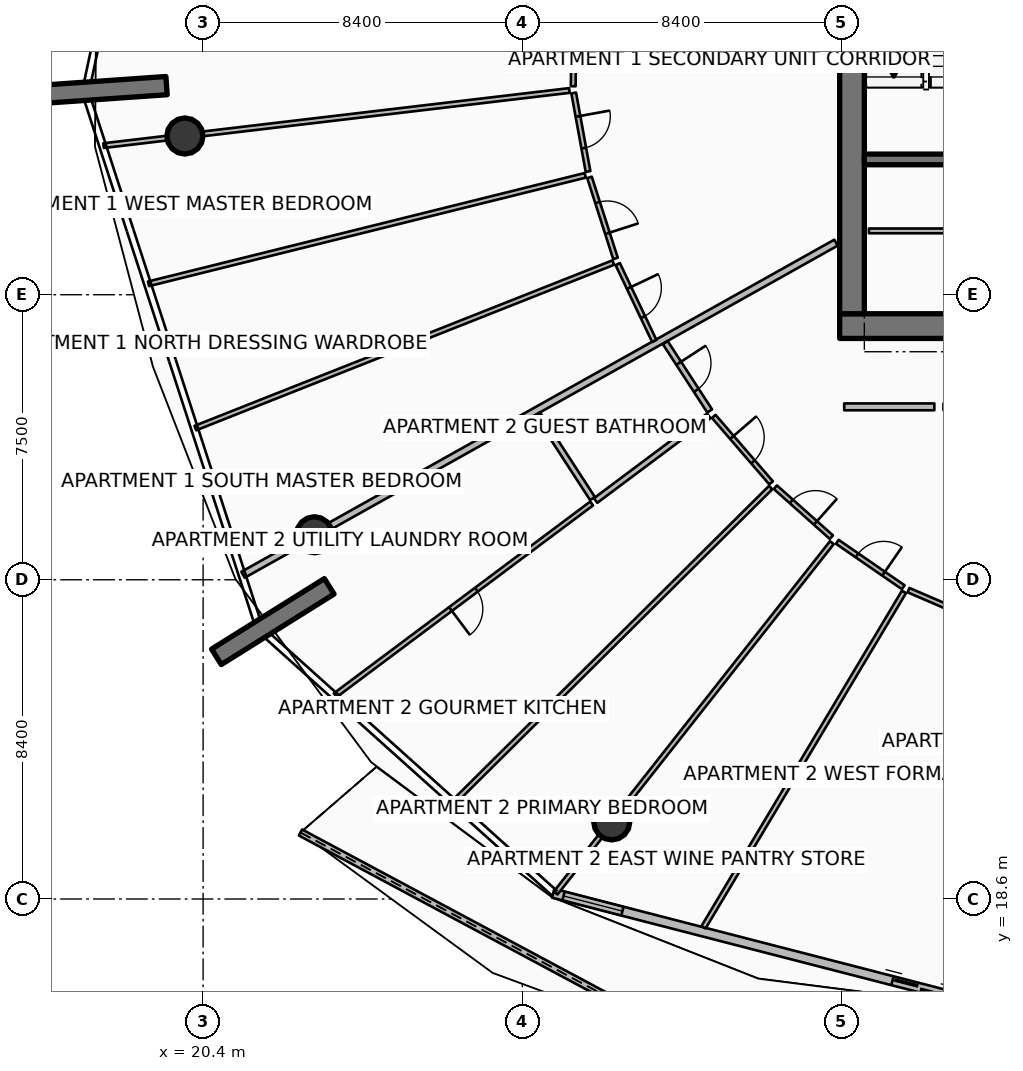
"""IFC4 building model, lengths in metres.
Left out: names, types, materials, properties, quantities, classifications, styles, units other than length and angle.
Written with IfcOpenShell. Run it as: python <this file> out.ifc"""

import sys

from ifc_helpers import new_model, si_unit, direction, frame, frame_2d, origin, origin_2d, place, context, subcontext, project, spatial, polyline, rectangle, circle, outline, extrude, element, fill, save


model = new_model("IFC4")
c1 = context("Model", 3, precision=1e-05, world=origin(), true_north=direction((0.0, 1.0)))
c2 = subcontext(c1, "Body", "Model", "MODEL_VIEW")
j1 = project(units=[si_unit("LENGTHUNIT", "METRE"), si_unit("PLANEANGLEUNIT", "RADIAN")], contexts=[c1])
p1 = place(None, origin())
s1 = spatial("IfcSite", under=j1, at=p1, CompositionType="ELEMENT")
p2 = place(p1, origin())
s2 = spatial("IfcBuilding", under=s1, at=p2, CompositionType="ELEMENT")
p3 = place(p2, frame((0.0, 0.0, 248.25)))
s3 = spatial("IfcBuildingStorey", under=s2, at=p3, CompositionType="ELEMENT", Elevation=248.25)
p4 = place(p3, frame((37.15, 33.675, 0.0), z_axis=(0.0, 0.0, 1.0), x_axis=(1.0, 0.0, 0.0)))
e1 = element("IfcWall", 1, at=p4, inside=s3, PredefinedType="SHEAR", context=c2, shape_type="SweptSolid", body=[
    extrude(rectangle(XDim=9.75, YDim=0.65, at=frame_2d((4.875, 0.0))), origin(), (0.0, 0.0, 1.0), 3.85),
])
p5 = place(p3, frame((37.475, 34.0, 0.0), z_axis=(0.0, 0.0, 1.0), x_axis=(0.0, 1.0, 0.0)))
e2 = element("IfcWall", 2, at=p5, inside=s3, PredefinedType="SHEAR", context=c2, shape_type="SweptSolid", body=[
    extrude(rectangle(XDim=16.0, YDim=0.65, at=frame_2d((8.0, 0.0))), origin(), (0.0, 0.0, 1.0), 3.85),
])
p6 = place(p3, frame((37.8, 38.06, 0.0), z_axis=(0.0, 0.0, 1.0), x_axis=(1.0, 0.0, 0.0)))
e3 = element("IfcWall", 3, at=p6, inside=s3, PredefinedType="SHEAR", context=c2, shape_type="SweptSolid", body=[
    extrude(rectangle(XDim=3.5, YDim=0.28, at=frame_2d((1.75, 0.0))), origin(), (0.0, 0.0, 1.0), 3.85),
])
p7 = place(p3, frame((19.438, 40.003, 0.0), z_axis=(0.0, 0.0, 1.0), x_axis=(-0.997563824095, -0.069759707979, 0.0)))
e4 = element("IfcWall", 4, at=p7, inside=s3, PredefinedType="SOLIDWALL", context=c2, shape_type="SweptSolid", body=[
    extrude(rectangle(XDim=3.5, YDim=0.48, at=frame_2d((1.75, 0.0))), origin(), (0.0, 0.0, 1.0), 3.85),
])
p8 = place(p3, frame((23.719, 26.827, 0.0), z_axis=(0.0, 0.0, 1.0), x_axis=(-0.848033572426, -0.529942506352, 0.0)))
e5 = element("IfcWall", 5, at=p8, inside=s3, PredefinedType="SOLIDWALL", context=c2, shape_type="SweptSolid", body=[
    extrude(rectangle(XDim=3.5, YDim=0.48, at=frame_2d((1.75, 0.0))), origin(), (0.0, 0.0, 1.0), 3.85),
])
for number, where, z_axis, x_axis in (
    (6, (19.92, 38.677, 0.0), (0.0, 0.0, 1.0), (1.0, 0.0, 0.0)),
    (7, (23.33, 28.184, 0.0), (0.0, 0.0, 1.0), (1.0, 0.0, 0.0)),
    (8, (31.153, 20.629, 0.0), (0.0, 0.0, 1.0), (1.0, 0.0, 0.0)),
):
    element("IfcColumn", number, at=place(p3, frame(where, z_axis=z_axis, x_axis=x_axis)), inside=s3, PredefinedType="COLUMN", context=c2, shape_type="SweptSolid", body=[
        extrude(circle(Radius=0.475, at=origin_2d()), origin(), (0.0, 0.0, 1.0), 3.59),
    ])
p9 = place(p3, frame((22.962, 20.35, 0.0), z_axis=(0.0, 0.0, 1.0), x_axis=(0.881580944095, -0.472032879161, 0.0)))
e9 = element("IfcWall", 9, at=p9, inside=s3, PredefinedType="PARAPET", context=c2, shape_type="SweptSolid", body=[
    extrude(outline(polyline([(0.0, 0.0), (12.362, 0.0), (12.362, 1.632), (6.181, 1.798), (0.0, 1.86), (0.0, 0.0)])), frame((0.0, 0.09, 0.0), z_axis=(0.0, -1.0, 0.0), x_axis=(1.0, 0.0, 0.0)), (0.0, 0.0, 1.0), 0.18),
])
p10 = place(p3, frame((29.614, 18.751, 0.0), z_axis=(0.0, 0.0, 1.0), x_axis=(0.968343758421, -0.249620442927, 0.0)))
e10 = element("IfcWall", 10, at=p10, inside=s3, PredefinedType="SOLIDWALL", context=c2, shape_type="SweptSolid", body=[
    extrude(rectangle(XDim=11.438, YDim=0.24, at=frame_2d((5.719, 0.0))), origin(), (0.0, 0.0, 1.0), 2.54),
])
p11 = place(p10, frame((9.218, 0.0, 0.0)))
e11 = element("IfcOpeningElement", 11, at=p11, cuts=e10, PredefinedType="OPENING", context=c2, shape_type="SweptSolid", body=[
    extrude(rectangle(XDim=1.45, YDim=2.15, at=frame_2d((0.725, 1.075))), frame((0.0, 0.13, 0.0), z_axis=(0.0, -1.0, 0.0), x_axis=(1.0, 0.0, 0.0)), (0.0, 0.0, 1.0), 0.26),
])
p12 = place(p10, frame((0.28, 0.0, 0.65)))
e12 = element("IfcOpeningElement", 12, at=p12, cuts=e10, PredefinedType="OPENING", context=c2, shape_type="SweptSolid", body=[
    extrude(rectangle(XDim=1.6, YDim=1.5, at=frame_2d((0.8, 0.75))), frame((0.0, 0.13, 0.0), z_axis=(0.0, -1.0, 0.0), x_axis=(1.0, 0.0, 0.0)), (0.0, 0.0, 1.0), 0.26),
])
p13 = place(p3, frame((37.92, 36.18, 0.0), z_axis=(0.0, 0.0, 1.0), x_axis=(1.0, 0.0, 0.0)))
e13 = element("IfcWall", 13, at=p13, inside=s3, PredefinedType="PARTITIONING", context=c2, shape_type="SweptSolid", body=[
    extrude(rectangle(XDim=8.8, YDim=0.125, at=frame_2d((4.4, 0.0))), origin(), (0.0, 0.0, 1.0), 3.03),
])
p14 = place(p13, frame((3.975, 0.0, 0.0)))
e14 = element("IfcOpeningElement", 14, at=p14, cuts=e13, PredefinedType="OPENING", context=c2, shape_type="SweptSolid", body=[
    extrude(rectangle(XDim=0.85, YDim=2.06, at=frame_2d((0.425, 1.03))), frame((0.0, 0.073, 0.0), z_axis=(0.0, -1.0, 0.0), x_axis=(1.0, 0.0, 0.0)), (0.0, 0.0, 1.0), 0.145),
])
p15 = place(p3, frame((37.054, 35.87, 0.0), z_axis=(0.0, 0.0, 1.0), x_axis=(-0.872490186067, -0.488631635506, 0.0)))
e15 = element("IfcWall", 15, at=p15, inside=s3, PredefinedType="PARTITIONING", context=c2, shape_type="SweptSolid", body=[
    extrude(rectangle(XDim=17.884, YDim=0.18, at=frame_2d((8.942, 0.0))), origin(), (0.0, 0.0, 1.0), 2.957),
])
p16 = place(p3, frame((30.204, 44.538, 0.0), z_axis=(0.0, 0.0, 1.0), x_axis=(-0.014156354672, -0.999899793791, 0.0)))
e16 = element("IfcWall", 16, at=p16, inside=s3, PredefinedType="PARTITIONING", context=c2, shape_type="SweptSolid", body=[
    extrude(rectangle(XDim=4.553, YDim=0.125, at=frame_2d((2.276, 0.0))), origin(), (0.0, 0.0, 1.0), 2.957),
])
p17 = place(p16, frame((1.826, 0.0, 0.0)))
e17 = element("IfcOpeningElement", 17, at=p17, cuts=e16, PredefinedType="OPENING", context=c2, shape_type="SweptSolid", body=[
    extrude(rectangle(XDim=0.9, YDim=2.08, at=frame_2d((0.45, 1.04))), frame((0.0, 0.073, 0.0), z_axis=(0.0, -1.0, 0.0), x_axis=(1.0, 0.0, 0.0)), (0.0, 0.0, 1.0), 0.145),
])
p18 = place(p3, frame((30.038, 39.874, 0.0), z_axis=(0.0, 0.0, 1.0), x_axis=(-0.993068810962, -0.117534406428, 0.0)))
e18 = element("IfcWall", 18, at=p18, inside=s3, PredefinedType="PARTITIONING", context=c2, shape_type="SweptSolid", body=[
    extrude(rectangle(XDim=12.343, YDim=0.125, at=frame_2d((6.171, 0.0))), origin(), (0.0, 0.0, 1.0), 2.957),
])
p19 = place(p3, frame((30.456, 37.642, 0.0), z_axis=(0.0, 0.0, 1.0), x_axis=(-0.970505215381, -0.241080125513, 0.0)))
e19 = element("IfcWall", 19, at=p19, inside=s3, PredefinedType="PARTITIONING", context=c2, shape_type="SweptSolid", body=[
    extrude(rectangle(XDim=11.843, YDim=0.125, at=frame_2d((5.921, 0.0))), origin(), (0.0, 0.0, 1.0), 3.03),
])
p20 = place(p3, frame((31.192, 35.345, 0.0), z_axis=(0.0, 0.0, 1.0), x_axis=(-0.929773642051, -0.368131735317, 0.0)))
e20 = element("IfcWall", 20, at=p20, inside=s3, PredefinedType="PARTITIONING", context=c2, shape_type="SweptSolid", body=[
    extrude(rectangle(XDim=11.827, YDim=0.125, at=frame_2d((5.913, 0.0))), origin(), (0.0, 0.0, 1.0), 3.03),
])
p21 = place(p3, frame((30.152, 39.807, 0.0), z_axis=(0.0, 0.0, 1.0), x_axis=(0.179601937348, -0.983739367973, 0.0)))
e21 = element("IfcWall", 21, at=p21, inside=s3, PredefinedType="PARTITIONING", context=c2, shape_type="SweptSolid", body=[
    extrude(rectangle(XDim=2.099, YDim=0.125, at=frame_2d((1.049, 0.0))), origin(), (0.0, 0.0, 1.0), 2.957),
])
p22 = place(p21, frame((0.625, 0.0, 0.0)))
e22 = element("IfcOpeningElement", 22, at=p22, cuts=e21, PredefinedType="OPENING", context=c2, shape_type="SweptSolid", body=[
    extrude(rectangle(XDim=0.85, YDim=2.06, at=frame_2d((0.425, 1.03))), frame((0.0, 0.073, 0.0), z_axis=(0.0, -1.0, 0.0), x_axis=(1.0, 0.0, 0.0)), (0.0, 0.0, 1.0), 0.145),
])
p23 = place(p3, frame((30.568, 37.588, 0.0), z_axis=(0.0, 0.0, 1.0), x_axis=(0.305285840617, -0.952260760254, 0.0)))
e23 = element("IfcWall", 23, at=p23, inside=s3, PredefinedType="PARTITIONING", context=c2, shape_type="SweptSolid", body=[
    extrude(rectangle(XDim=2.24, YDim=0.125, at=frame_2d((1.12, 0.0))), origin(), (0.0, 0.0, 1.0), 3.03),
])
p24 = place(p23, frame((0.695, 0.0, 0.0)))
e24 = element("IfcOpeningElement", 24, at=p24, cuts=e23, PredefinedType="OPENING", context=c2, shape_type="SweptSolid", body=[
    extrude(rectangle(XDim=0.85, YDim=2.06, at=frame_2d((0.425, 1.03))), frame((0.0, 0.073, 0.0), z_axis=(0.0, -1.0, 0.0), x_axis=(1.0, 0.0, 0.0)), (0.0, 0.0, 1.0), 0.145),
])
p25 = place(p3, frame((31.31, 35.306, 0.0), z_axis=(0.0, 0.0, 1.0), x_axis=(0.429468098594, -0.903082029657, 0.0)))
e25 = element("IfcWall", 25, at=p25, inside=s3, PredefinedType="PARTITIONING", context=c2, shape_type="SweptSolid", body=[
    extrude(rectangle(XDim=2.24, YDim=0.125, at=frame_2d((1.12, 0.0))), origin(), (0.0, 0.0, 1.0), 2.957),
])
p26 = place(p25, frame((0.695, 0.0, 0.0)))
e26 = element("IfcOpeningElement", 26, at=p26, cuts=e25, PredefinedType="OPENING", context=c2, shape_type="SweptSolid", body=[
    extrude(rectangle(XDim=0.85, YDim=2.06, at=frame_2d((0.425, 1.03))), frame((0.0, 0.073, 0.0), z_axis=(0.0, -1.0, 0.0), x_axis=(1.0, 0.0, 0.0)), (0.0, 0.0, 1.0), 0.145),
])
p27 = place(p3, frame((37.27, 31.55, 0.0), z_axis=(0.0, 0.0, 1.0), x_axis=(1.0, 0.0, 0.0)))
e27 = element("IfcWall", 27, at=p27, inside=s3, PredefinedType="PARTITIONING", context=c2, shape_type="SweptSolid", body=[
    extrude(rectangle(XDim=2.372, YDim=0.18, at=frame_2d((1.186, 0.0))), origin(), (0.0, 0.0, 1.0), 2.957),
])
p28 = place(p3, frame((32.562, 33.24, 0.0), z_axis=(0.0, 0.0, 1.0), x_axis=(0.544888302375, -0.838508639154, 0.0)))
e28 = element("IfcWall", 28, at=p28, inside=s3, PredefinedType="PARTITIONING", context=c2, shape_type="SweptSolid", body=[
    extrude(rectangle(XDim=2.144, YDim=0.15, at=frame_2d((1.072, 0.0))), origin(), (0.0, 0.0, 1.0), 2.957),
])
p29 = place(p28, frame((0.647, 0.0, 0.0)))
e29 = element("IfcOpeningElement", 29, at=p29, cuts=e28, PredefinedType="OPENING", context=c2, shape_type="SweptSolid", body=[
    extrude(rectangle(XDim=0.85, YDim=2.06, at=frame_2d((0.425, 1.03))), frame((0.0, 0.085, 0.0), z_axis=(0.0, -1.0, 0.0), x_axis=(1.0, 0.0, 0.0)), (0.0, 0.0, 1.0), 0.17),
])
p30 = place(p3, frame((29.202, 31.359, 0.0), z_axis=(0.0, 0.0, 1.0), x_axis=(0.544926834082, -0.838483598825, 0.0)))
e30 = element("IfcWall", 30, at=p30, inside=s3, PredefinedType="PARTITIONING", context=c2, shape_type="SweptSolid", body=[
    extrude(rectangle(XDim=2.651, YDim=0.15, at=frame_2d((1.325, 0.0))), origin(), (0.0, 0.0, 1.0), 2.957),
])
p31 = place(p3, frame((33.707, 31.312, 0.0), z_axis=(0.0, 0.0, 1.0), x_axis=(-0.800889069655, -0.598812740435, 0.0)))
e31 = element("IfcWall", 31, at=p31, inside=s3, PredefinedType="PARTITIONING", context=c2, shape_type="SweptSolid", body=[
    extrude(rectangle(XDim=3.72, YDim=0.15, at=frame_2d((1.86, 0.0))), origin(), (0.0, 0.0, 1.0), 3.03),
])
p32 = place(p3, frame((30.624, 29.007, 0.0), z_axis=(0.0, 0.0, 1.0), x_axis=(-0.800861586428, -0.598849496437, 0.0)))
e32 = element("IfcWall", 32, at=p32, inside=s3, PredefinedType="PARTITIONING", context=c2, shape_type="SweptSolid", body=[
    extrude(rectangle(XDim=8.425, YDim=0.125, at=frame_2d((4.212, 0.0))), origin(), (0.0, 0.0, 1.0), 3.03),
])
p33 = place(p32, frame((3.787, 0.0, 0.0)))
e33 = element("IfcOpeningElement", 33, at=p33, cuts=e32, PredefinedType="OPENING", context=c2, shape_type="SweptSolid", body=[
    extrude(rectangle(XDim=0.85, YDim=2.06, at=frame_2d((0.425, 1.03))), frame((0.0, 0.073, 0.0), z_axis=(0.0, -1.0, 0.0), x_axis=(1.0, 0.0, 0.0)), (0.0, 0.0, 1.0), 0.145),
])
p34 = place(p3, frame((35.335, 29.426, 0.0), z_axis=(0.0, 0.0, 1.0), x_axis=(-0.709660425086, -0.704543881576, 0.0)))
e34 = element("IfcWall", 34, at=p34, inside=s3, PredefinedType="PARTITIONING", context=c2, shape_type="SweptSolid", body=[
    extrude(rectangle(XDim=11.738, YDim=0.125, at=frame_2d((5.869, 0.0))), origin(), (0.0, 0.0, 1.0), 3.03),
])
p35 = place(p3, frame((33.838, 31.298, 0.0), z_axis=(0.0, 0.0, 1.0), x_axis=(0.653278423857, -0.757117758954, 0.0)))
e35 = element("IfcWall", 35, at=p35, inside=s3, PredefinedType="PARTITIONING", context=c2, shape_type="SweptSolid", body=[
    extrude(rectangle(XDim=2.309, YDim=0.125, at=frame_2d((1.154, 0.0))), origin(), (0.0, 0.0, 1.0), 3.03),
])
p36 = place(p35, frame((0.729, 0.0, 0.0)))
e36 = element("IfcOpeningElement", 36, at=p36, cuts=e35, PredefinedType="OPENING", context=c2, shape_type="SweptSolid", body=[
    extrude(rectangle(XDim=0.85, YDim=2.06, at=frame_2d((0.425, 1.03))), frame((0.0, 0.073, 0.0), z_axis=(0.0, -1.0, 0.0), x_axis=(1.0, 0.0, 0.0)), (0.0, 0.0, 1.0), 0.145),
])
p37 = place(p3, frame((35.458, 29.436, 0.0), z_axis=(0.0, 0.0, 1.0), x_axis=(0.746255603185, -0.665659503586, 0.0)))
e37 = element("IfcWall", 37, at=p37, inside=s3, PredefinedType="PARTITIONING", context=c2, shape_type="SweptSolid", body=[
    extrude(rectangle(XDim=1.975, YDim=0.125, at=frame_2d((0.988, 0.0))), origin(), (0.0, 0.0, 1.0), 2.957),
])
p38 = place(p37, frame((0.562, 0.0, 0.0)))
e38 = element("IfcOpeningElement", 38, at=p38, cuts=e37, PredefinedType="OPENING", context=c2, shape_type="SweptSolid", body=[
    extrude(rectangle(XDim=0.85, YDim=2.06, at=frame_2d((0.425, 1.03))), frame((0.0, 0.073, 0.0), z_axis=(0.0, -1.0, 0.0), x_axis=(1.0, 0.0, 0.0)), (0.0, 0.0, 1.0), 0.145),
])
p39 = place(p3, frame((39.882, 31.55, 0.0), z_axis=(0.0, 0.0, 1.0), x_axis=(1.0, 0.0, 0.0)))
e39 = element("IfcWall", 39, at=p39, inside=s3, PredefinedType="PARTITIONING", context=c2, shape_type="SweptSolid", body=[
    extrude(rectangle(XDim=5.051, YDim=0.18, at=frame_2d((2.525, 0.0))), origin(), (0.0, 0.0, 1.0), 2.957),
])
p40 = place(p3, frame((36.945, 27.977, 0.0), z_axis=(0.0, 0.0, 1.0), x_axis=(-0.619096573209, -0.785314862358, 0.0)))
e40 = element("IfcWall", 40, at=p40, inside=s3, PredefinedType="PARTITIONING", context=c2, shape_type="SweptSolid", body=[
    extrude(rectangle(XDim=11.739, YDim=0.125, at=frame_2d((5.869, 0.0))), origin(), (0.0, 0.0, 1.0), 2.957),
])
p41 = place(p3, frame((38.843, 26.681, 0.0), z_axis=(0.0, 0.0, 1.0), x_axis=(-0.513080899873, -0.858340253154, 0.0)))
e41 = element("IfcWall", 41, at=p41, inside=s3, PredefinedType="PARTITIONING", context=c2, shape_type="SweptSolid", body=[
    extrude(rectangle(XDim=10.282, YDim=0.125, at=frame_2d((5.141, 0.0))), origin(), (0.0, 0.0, 1.0), 3.03),
])
p42 = place(p3, frame((37.089, 27.998, 0.0), z_axis=(0.0, 0.0, 1.0), x_axis=(0.823534084839, -0.567266790063, 0.0)))
e42 = element("IfcWall", 42, at=p42, inside=s3, PredefinedType="PARTITIONING", context=c2, shape_type="SweptSolid", body=[
    extrude(rectangle(XDim=2.105, YDim=0.125, at=frame_2d((1.053, 0.0))), origin(), (0.0, 0.0, 1.0), 2.957),
])
p43 = place(p42, frame((0.628, 0.0, 0.0)))
e43 = element("IfcOpeningElement", 43, at=p43, cuts=e42, PredefinedType="OPENING", context=c2, shape_type="SweptSolid", body=[
    extrude(rectangle(XDim=0.85, YDim=2.06, at=frame_2d((0.425, 1.03))), frame((0.0, 0.073, 0.0), z_axis=(0.0, -1.0, 0.0), x_axis=(1.0, 0.0, 0.0)), (0.0, 0.0, 1.0), 0.145),
])
p44 = place(p3, frame((38.962, 26.727, 0.0), z_axis=(0.0, 0.0, 1.0), x_axis=(0.918384361194, -0.395689480671, 0.0)))
e44 = element("IfcWall", 44, at=p44, inside=s3, PredefinedType="PARTITIONING", context=c2, shape_type="SweptSolid", body=[
    extrude(rectangle(XDim=4.492, YDim=0.125, at=frame_2d((2.246, 0.0))), origin(), (0.0, 0.0, 1.0), 2.957),
])
p45 = place(p44, frame((1.796, 0.0, 0.0)))
e45 = element("IfcOpeningElement", 45, at=p45, cuts=e44, PredefinedType="OPENING", context=c2, shape_type="SweptSolid", body=[
    extrude(rectangle(XDim=0.9, YDim=2.08, at=frame_2d((0.45, 1.04))), frame((0.0, 0.073, 0.0), z_axis=(0.0, -1.0, 0.0), x_axis=(1.0, 0.0, 0.0)), (0.0, 0.0, 1.0), 0.145),
])
p46 = place(p11, origin())
e46 = element("IfcDoor", 46, at=p46, inside=s3, OperationType="DOUBLE_DOOR_SLIDING", PredefinedType="DOOR", context=c2, shape_type="SweptSolid", body=[
    extrude(rectangle(XDim=1.45, YDim=2.15, at=frame_2d((0.725, 1.075))), frame((0.0, 0.025, 0.0), z_axis=(0.0, -1.0, 0.0), x_axis=(1.0, 0.0, 0.0)), (0.0, 0.0, 1.0), 0.05),
])
fill(e11, e46)
p47 = place(p12, origin())
e47 = element("IfcWindow", 47, at=p47, inside=s3, PartitioningType="SINGLE_PANEL", PredefinedType="WINDOW", context=c2, shape_type="SweptSolid", body=[
    extrude(rectangle(XDim=1.6, YDim=1.5, at=frame_2d((0.8, 0.75))), frame((0.0, 0.03, 0.0), z_axis=(0.0, -1.0, 0.0), x_axis=(1.0, 0.0, 0.0)), (0.0, 0.0, 1.0), 0.06),
])
fill(e12, e47)
p48 = place(p22, origin())
e48 = element("IfcDoor", 48, at=p48, inside=s3, OperationType="SINGLE_SWING_LEFT", PredefinedType="DOOR", context=c2, shape_type="SweptSolid", body=[
    extrude(rectangle(XDim=0.85, YDim=2.06, at=frame_2d((0.425, 1.03))), frame((0.0, 0.025, 0.0), z_axis=(0.0, -1.0, 0.0), x_axis=(1.0, 0.0, 0.0)), (0.0, 0.0, 1.0), 0.05),
])
fill(e22, e48)
p49 = place(p24, origin())
e49 = element("IfcDoor", 49, at=p49, inside=s3, OperationType="SINGLE_SWING_RIGHT", PredefinedType="DOOR", context=c2, shape_type="SweptSolid", body=[
    extrude(rectangle(XDim=0.85, YDim=2.06, at=frame_2d((0.425, 1.03))), frame((0.0, 0.025, 0.0), z_axis=(0.0, -1.0, 0.0), x_axis=(1.0, 0.0, 0.0)), (0.0, 0.0, 1.0), 0.05),
])
fill(e24, e49)
p50 = place(p26, origin())
e50 = element("IfcDoor", 50, at=p50, inside=s3, OperationType="SINGLE_SWING_LEFT", PredefinedType="DOOR", context=c2, shape_type="SweptSolid", body=[
    extrude(rectangle(XDim=0.85, YDim=2.06, at=frame_2d((0.425, 1.03))), frame((0.0, 0.025, 0.0), z_axis=(0.0, -1.0, 0.0), x_axis=(1.0, 0.0, 0.0)), (0.0, 0.0, 1.0), 0.05),
])
fill(e26, e50)
p51 = place(p29, origin())
e51 = element("IfcDoor", 51, at=p51, inside=s3, OperationType="SINGLE_SWING_LEFT", PredefinedType="DOOR", context=c2, shape_type="SweptSolid", body=[
    extrude(rectangle(XDim=0.85, YDim=2.06, at=frame_2d((0.425, 1.03))), frame((0.0, 0.025, 0.0), z_axis=(0.0, -1.0, 0.0), x_axis=(1.0, 0.0, 0.0)), (0.0, 0.0, 1.0), 0.05),
])
fill(e29, e51)
p52 = place(p33, origin())
e52 = element("IfcDoor", 52, at=p52, inside=s3, OperationType="SINGLE_SWING_RIGHT", PredefinedType="DOOR", context=c2, shape_type="SweptSolid", body=[
    extrude(rectangle(XDim=0.85, YDim=2.06, at=frame_2d((0.425, 1.03))), frame((0.0, 0.025, 0.0), z_axis=(0.0, -1.0, 0.0), x_axis=(1.0, 0.0, 0.0)), (0.0, 0.0, 1.0), 0.05),
])
fill(e33, e52)
p53 = place(p36, origin())
e53 = element("IfcDoor", 53, at=p53, inside=s3, OperationType="SINGLE_SWING_LEFT", PredefinedType="DOOR", context=c2, shape_type="SweptSolid", body=[
    extrude(rectangle(XDim=0.85, YDim=2.06, at=frame_2d((0.425, 1.03))), frame((0.0, 0.025, 0.0), z_axis=(0.0, -1.0, 0.0), x_axis=(1.0, 0.0, 0.0)), (0.0, 0.0, 1.0), 0.05),
])
fill(e36, e53)
p54 = place(p38, origin())
e54 = element("IfcDoor", 54, at=p54, inside=s3, OperationType="SINGLE_SWING_RIGHT", PredefinedType="DOOR", context=c2, shape_type="SweptSolid", body=[
    extrude(rectangle(XDim=0.85, YDim=2.06, at=frame_2d((0.425, 1.03))), frame((0.0, 0.025, 0.0), z_axis=(0.0, -1.0, 0.0), x_axis=(1.0, 0.0, 0.0)), (0.0, 0.0, 1.0), 0.05),
])
fill(e38, e54)
p55 = place(p43, origin())
e55 = element("IfcDoor", 55, at=p55, inside=s3, OperationType="SINGLE_SWING_RIGHT", PredefinedType="DOOR", context=c2, shape_type="SweptSolid", body=[
    extrude(rectangle(XDim=0.85, YDim=2.06, at=frame_2d((0.425, 1.03))), frame((0.0, 0.025, 0.0), z_axis=(0.0, -1.0, 0.0), x_axis=(1.0, 0.0, 0.0)), (0.0, 0.0, 1.0), 0.05),
])
fill(e43, e55)
save(model, sys.argv[1])
